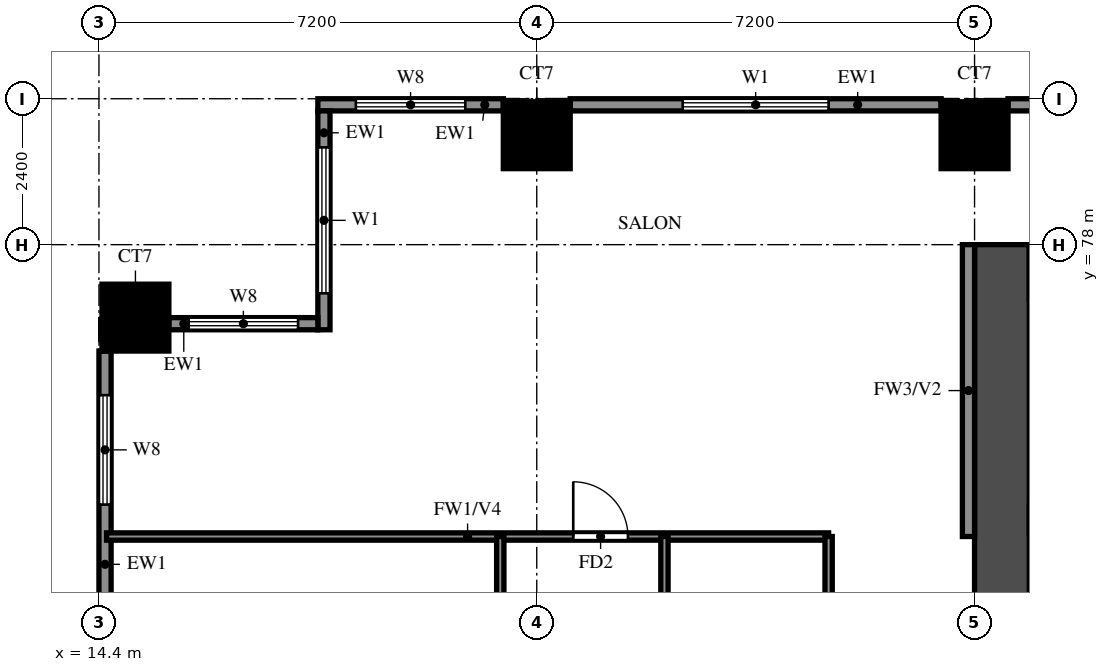
"""IFC4 building model, lengths in metres.
Left out: names, types, materials, properties, quantities, classifications, styles, units other than length and angle.
Written with IfcOpenShell. Run it as: python <this file> out.ifc"""

import sys

from ifc_helpers import new_model, si_unit, direction, frame, frame_2d, origin, origin_2d, place, context, subcontext, project, spatial, rectangle, extrude, source, transform, mapped, element, fill, save


model = new_model("IFC4")
c1 = context("Model", 3, precision=1e-05, world=origin(), true_north=direction((0.0, 1.0)))
c2 = subcontext(c1, "Body", "Model", "MODEL_VIEW")
j1 = project(units=[si_unit("LENGTHUNIT", "METRE"), si_unit("PLANEANGLEUNIT", "RADIAN")], contexts=[c1])
p1 = place(None, origin())
s1 = spatial("IfcSite", under=j1, at=p1, CompositionType="ELEMENT")
p2 = place(p1, origin())
s2 = spatial("IfcBuilding", under=s1, at=p2, CompositionType="ELEMENT")
p3 = place(p2, frame((0.0, 0.0, 48.0)))
s3 = spatial("IfcBuildingStorey", under=s2, at=p3, CompositionType="ELEMENT", Elevation=48.0)
m1 = source(origin(), c2, "Body", "SweptSolid", [
    extrude(rectangle(XDim=1.1, YDim=1.1, at=origin_2d()), origin(), (0.0, 0.0, 1.0), 3.18),
])
for number, where, z_axis, x_axis in (
    (1, (15.0, 76.8, 0.0), (0.0, 0.0, 1.0), (1.0, 0.0, 0.0)),
    (2, (21.6, 79.8, 0.0), (0.0, 0.0, 1.0), (1.0, 0.0, 0.0)),
    (3, (28.8, 79.8, 0.0), (0.0, 0.0, 1.0), (1.0, 0.0, 0.0)),
):
    element("IfcColumn", number, at=place(p3, frame(where, z_axis=z_axis, x_axis=x_axis)), inside=s3, PredefinedType="COLUMN", context=c2, shape_type="MappedRepresentation", body=[
        mapped(m1, transform((0.0, 0.0, 0.0))),
    ])
p4 = place(p3, frame((29.25, 66.0, 0.0), z_axis=(0.0, 0.0, 1.0), x_axis=(0.0, 1.0, 0.0)))
e4 = element("IfcWall", 4, at=p4, inside=s3, PredefinedType="SHEAR", context=c2, shape_type="SweptSolid", body=[
    extrude(rectangle(XDim=12.0, YDim=0.9, at=frame_2d((6.0, 0.0))), origin(), (0.0, 0.0, 1.0), 3.18),
])
p5 = place(p3, frame((29.7, 73.475, 0.0), z_axis=(0.0, 0.0, 1.0), x_axis=(1.0, 0.0, 0.0)))
e5 = element("IfcWall", 5, at=p5, inside=s3, PredefinedType="SHEAR", context=c2, shape_type="SweptSolid", body=[
    extrude(rectangle(XDim=3.175, YDim=0.45, at=frame_2d((1.587, 0.0))), origin(), (0.0, 0.0, 1.0), 3.18),
])
p6 = place(p3, frame((35.45, 80.3, 0.0), z_axis=(0.0, 0.0, 1.0), x_axis=(-1.0, 0.0, 0.0)))
e6 = element("IfcWall", 6, at=p6, inside=s3, PredefinedType="SOLIDWALL", context=c2, shape_type="SweptSolid", body=[
    extrude(rectangle(XDim=6.1, YDim=0.2, at=frame_2d((3.05, 0.0))), origin(), (0.0, 0.0, 1.0), 3.18),
])
p7 = place(p3, frame((28.25, 80.3, 0.0), z_axis=(0.0, 0.0, 1.0), x_axis=(-1.0, 0.0, 0.0)))
e7 = element("IfcWall", 7, at=p7, inside=s3, PredefinedType="SOLIDWALL", context=c2, shape_type="SweptSolid", body=[
    extrude(rectangle(XDim=6.1, YDim=0.2, at=frame_2d((3.05, 0.0))), origin(), (0.0, 0.0, 1.0), 3.18),
])
p8 = place(p7, frame((1.85, 0.0, 0.6)))
e8 = element("IfcOpeningElement", 8, at=p8, cuts=e7, PredefinedType="OPENING", context=c2, shape_type="SweptSolid", body=[
    extrude(rectangle(XDim=2.4, YDim=2.4, at=frame_2d((1.2, 1.2))), frame((0.0, 0.11, 0.0), z_axis=(0.0, -1.0, 0.0), x_axis=(1.0, 0.0, 0.0)), (0.0, 0.0, 1.0), 0.22),
])
p9 = place(p3, frame((21.05, 80.3, 0.0), z_axis=(0.0, 0.0, 1.0), x_axis=(-1.0, 0.0, 0.0)))
e9 = element("IfcWall", 9, at=p9, inside=s3, PredefinedType="SOLIDWALL", context=c2, shape_type="SweptSolid", body=[
    extrude(rectangle(XDim=3.05, YDim=0.2, at=frame_2d((1.525, 0.0))), origin(), (0.0, 0.0, 1.0), 3.18),
])
p10 = place(p9, frame((0.625, 0.0, 0.6)))
e10 = element("IfcOpeningElement", 10, at=p10, cuts=e9, PredefinedType="OPENING", context=c2, shape_type="SweptSolid", body=[
    extrude(rectangle(XDim=1.8, YDim=2.4, at=frame_2d((0.9, 1.2))), frame((0.0, 0.11, 0.0), z_axis=(0.0, -1.0, 0.0), x_axis=(1.0, 0.0, 0.0)), (0.0, 0.0, 1.0), 0.22),
])
p11 = place(p3, frame((18.1, 80.2, 0.0), z_axis=(0.0, 0.0, 1.0), x_axis=(0.0, -1.0, 0.0)))
e11 = element("IfcWall", 11, at=p11, inside=s3, PredefinedType="SOLIDWALL", context=c2, shape_type="SweptSolid", body=[
    extrude(rectangle(XDim=3.6, YDim=0.2, at=frame_2d((1.8, 0.0))), origin(), (0.0, 0.0, 1.0), 3.18),
])
p12 = place(p11, frame((0.6, 0.0, 0.6)))
e12 = element("IfcOpeningElement", 12, at=p12, cuts=e11, PredefinedType="OPENING", context=c2, shape_type="SweptSolid", body=[
    extrude(rectangle(XDim=2.4, YDim=2.4, at=frame_2d((1.2, 1.2))), frame((0.0, 0.11, 0.0), z_axis=(0.0, -1.0, 0.0), x_axis=(1.0, 0.0, 0.0)), (0.0, 0.0, 1.0), 0.22),
])
p13 = place(p3, frame((18.0, 76.7, 0.0), z_axis=(0.0, 0.0, 1.0), x_axis=(-1.0, 0.0, 0.0)))
e13 = element("IfcWall", 13, at=p13, inside=s3, PredefinedType="SOLIDWALL", context=c2, shape_type="SweptSolid", body=[
    extrude(rectangle(XDim=2.45, YDim=0.2, at=frame_2d((1.225, 0.0))), origin(), (0.0, 0.0, 1.0), 3.18),
])
p14 = place(p13, frame((0.325, 0.0, 0.6)))
e14 = element("IfcOpeningElement", 14, at=p14, cuts=e13, PredefinedType="OPENING", context=c2, shape_type="SweptSolid", body=[
    extrude(rectangle(XDim=1.8, YDim=2.4, at=frame_2d((0.9, 1.2))), frame((0.0, 0.11, 0.0), z_axis=(0.0, -1.0, 0.0), x_axis=(1.0, 0.0, 0.0)), (0.0, 0.0, 1.0), 0.22),
])
p15 = place(p3, frame((14.5, 76.25, 0.0), z_axis=(0.0, 0.0, 1.0), x_axis=(0.0, -1.0, 0.0)))
e15 = element("IfcWall", 15, at=p15, inside=s3, PredefinedType="SOLIDWALL", context=c2, shape_type="SweptSolid", body=[
    extrude(rectangle(XDim=6.1, YDim=0.2, at=frame_2d((3.05, 0.0))), origin(), (0.0, 0.0, 1.0), 3.18),
])
p16 = place(p15, frame((4.025, 0.0, 1.5)))
e16 = element("IfcOpeningElement", 16, at=p16, cuts=e15, PredefinedType="OPENING", context=c2, shape_type="SweptSolid", body=[
    extrude(rectangle(XDim=0.9, YDim=0.9, at=frame_2d((0.45, 0.45))), frame((0.0, 0.11, 0.0), z_axis=(0.0, -1.0, 0.0), x_axis=(1.0, 0.0, 0.0)), (0.0, 0.0, 1.0), 0.22),
])
p17 = place(p15, frame((0.725, 0.0, 0.6)))
e17 = element("IfcOpeningElement", 17, at=p17, cuts=e15, PredefinedType="OPENING", context=c2, shape_type="SweptSolid", body=[
    extrude(rectangle(XDim=1.8, YDim=2.4, at=frame_2d((0.9, 1.2))), frame((0.0, 0.11, 0.0), z_axis=(0.0, -1.0, 0.0), x_axis=(1.0, 0.0, 0.0)), (0.0, 0.0, 1.0), 0.22),
])
p18 = place(p3, frame((28.7, 73.2, 0.0), z_axis=(0.0, 0.0, 1.0), x_axis=(0.0, 1.0, 0.0)))
e18 = element("IfcWall", 18, at=p18, inside=s3, PredefinedType="SOLIDWALL", context=c2, shape_type="SweptSolid", body=[
    extrude(rectangle(XDim=4.8, YDim=0.2, at=frame_2d((2.4, 0.0))), origin(), (0.0, 0.0, 1.0), 3.18),
])
p19 = place(p3, frame((14.525, 73.2, 0.0), z_axis=(0.0, 0.0, 1.0), x_axis=(1.0, 0.0, 0.0)))
e19 = element("IfcWall", 19, at=p19, inside=s3, PredefinedType="PARTITIONING", context=c2, shape_type="SweptSolid", body=[
    extrude(rectangle(XDim=11.875, YDim=0.12, at=frame_2d((5.938, 0.0))), origin(), (0.0, 0.0, 1.0), 2.28),
])
p20 = place(p19, frame((7.675, 0.0, 0.0)))
e20 = element("IfcOpeningElement", 20, at=p20, cuts=e19, PredefinedType="OPENING", context=c2, shape_type="SweptSolid", body=[
    extrude(rectangle(XDim=0.9, YDim=2.1, at=frame_2d((0.45, 1.05))), frame((0.0, 0.07, 0.0), z_axis=(0.0, -1.0, 0.0), x_axis=(1.0, 0.0, 0.0)), (0.0, 0.0, 1.0), 0.14),
])
p21 = place(p3, frame((21.0, 69.6, 0.0), z_axis=(0.0, 0.0, 1.0), x_axis=(0.0, 1.0, 0.0)))
e21 = element("IfcWall", 21, at=p21, inside=s3, PredefinedType="PARTITIONING", context=c2, shape_type="SweptSolid", body=[
    extrude(rectangle(XDim=3.6, YDim=0.12, at=frame_2d((1.8, 0.0))), origin(), (0.0, 0.0, 1.0), 3.18),
])
p22 = place(p3, frame((23.7, 61.2, 0.0), z_axis=(0.0, 0.0, 1.0), x_axis=(0.0, 1.0, 0.0)))
e22 = element("IfcWall", 22, at=p22, inside=s3, PredefinedType="PARTITIONING", context=c2, shape_type="SweptSolid", body=[
    extrude(rectangle(XDim=12.0, YDim=0.12, at=frame_2d((6.0, 0.0))), origin(), (0.0, 0.0, 1.0), 3.18),
])
p23 = place(p22, frame((4.55, 0.0, 0.0)))
e23 = element("IfcOpeningElement", 23, at=p23, cuts=e22, PredefinedType="OPENING", context=c2, shape_type="SweptSolid", body=[
    extrude(rectangle(XDim=0.9, YDim=2.1, at=frame_2d((0.45, 1.05))), frame((0.0, 0.07, 0.0), z_axis=(0.0, -1.0, 0.0), x_axis=(1.0, 0.0, 0.0)), (0.0, 0.0, 1.0), 0.14),
])
p24 = place(p22, frame((9.3, 0.0, 0.0)))
e24 = element("IfcOpeningElement", 24, at=p24, cuts=e22, PredefinedType="OPENING", context=c2, shape_type="SweptSolid", body=[
    extrude(rectangle(XDim=0.8, YDim=2.1, at=frame_2d((0.4, 1.05))), frame((0.0, 0.07, 0.0), z_axis=(0.0, -1.0, 0.0), x_axis=(1.0, 0.0, 0.0)), (0.0, 0.0, 1.0), 0.14),
])
p25 = place(p3, frame((26.4, 68.6, 0.0), z_axis=(0.0, 0.0, 1.0), x_axis=(0.0, 1.0, 0.0)))
e25 = element("IfcWall", 25, at=p25, inside=s3, PredefinedType="PARTITIONING", context=c2, shape_type="SweptSolid", body=[
    extrude(rectangle(XDim=4.6, YDim=0.12, at=frame_2d((2.3, 0.0))), origin(), (0.0, 0.0, 1.0), 3.18),
])
p26 = place(p8, origin())
e26 = element("IfcWindow", 26, at=p26, inside=s3, PartitioningType="DOUBLE_PANEL_VERTICAL", PredefinedType="WINDOW", context=c2, shape_type="SweptSolid", body=[
    extrude(rectangle(XDim=2.4, YDim=2.4, at=frame_2d((1.2, 1.2))), frame((0.0, 0.03, 0.0), z_axis=(0.0, -1.0, 0.0), x_axis=(1.0, 0.0, 0.0)), (0.0, 0.0, 1.0), 0.06),
])
fill(e8, e26)
p27 = place(p10, origin())
e27 = element("IfcWindow", 27, at=p27, inside=s3, PartitioningType="DOUBLE_PANEL_VERTICAL", PredefinedType="WINDOW", context=c2, shape_type="SweptSolid", body=[
    extrude(rectangle(XDim=1.8, YDim=2.4, at=frame_2d((0.9, 1.2))), frame((0.0, 0.03, 0.0), z_axis=(0.0, -1.0, 0.0), x_axis=(1.0, 0.0, 0.0)), (0.0, 0.0, 1.0), 0.06),
])
fill(e10, e27)
p28 = place(p12, origin())
e28 = element("IfcWindow", 28, at=p28, inside=s3, PartitioningType="DOUBLE_PANEL_VERTICAL", PredefinedType="WINDOW", context=c2, shape_type="SweptSolid", body=[
    extrude(rectangle(XDim=2.4, YDim=2.4, at=frame_2d((1.2, 1.2))), frame((0.0, 0.03, 0.0), z_axis=(0.0, -1.0, 0.0), x_axis=(1.0, 0.0, 0.0)), (0.0, 0.0, 1.0), 0.06),
])
fill(e12, e28)
p29 = place(p14, origin())
e29 = element("IfcWindow", 29, at=p29, inside=s3, PartitioningType="DOUBLE_PANEL_VERTICAL", PredefinedType="WINDOW", context=c2, shape_type="SweptSolid", body=[
    extrude(rectangle(XDim=1.8, YDim=2.4, at=frame_2d((0.9, 1.2))), frame((0.0, 0.03, 0.0), z_axis=(0.0, -1.0, 0.0), x_axis=(1.0, 0.0, 0.0)), (0.0, 0.0, 1.0), 0.06),
])
fill(e14, e29)
p30 = place(p17, origin())
e30 = element("IfcWindow", 30, at=p30, inside=s3, PartitioningType="DOUBLE_PANEL_VERTICAL", PredefinedType="WINDOW", context=c2, shape_type="SweptSolid", body=[
    extrude(rectangle(XDim=1.8, YDim=2.4, at=frame_2d((0.9, 1.2))), frame((0.0, 0.03, 0.0), z_axis=(0.0, -1.0, 0.0), x_axis=(1.0, 0.0, 0.0)), (0.0, 0.0, 1.0), 0.06),
])
fill(e17, e30)
p31 = place(p20, origin())
e31 = element("IfcDoor", 31, at=p31, inside=s3, OperationType="SINGLE_SWING_LEFT", PredefinedType="DOOR", context=c2, shape_type="SweptSolid", body=[
    extrude(rectangle(XDim=0.9, YDim=2.1, at=frame_2d((0.45, 1.05))), frame((0.0, 0.025, 0.0), z_axis=(0.0, -1.0, 0.0), x_axis=(1.0, 0.0, 0.0)), (0.0, 0.0, 1.0), 0.05),
])
fill(e20, e31)
save(model, sys.argv[1])
